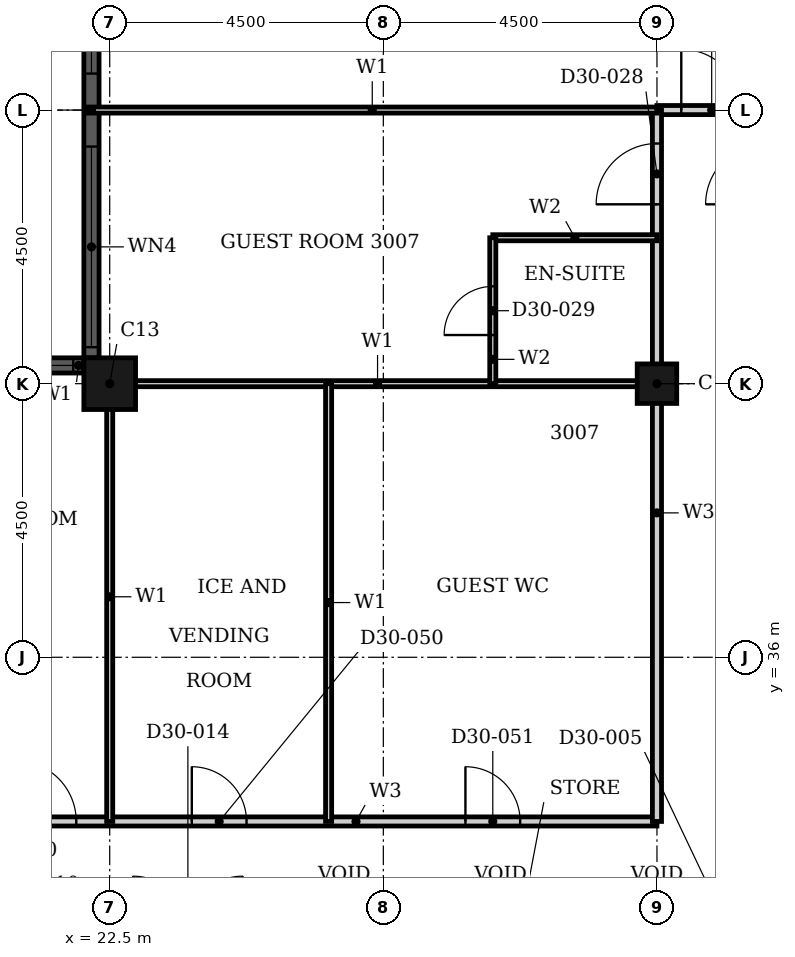
"""IFC4 building model, lengths in metres.
Left out: names, types, materials, properties, quantities, classifications, styles, units other than length and angle.
Written with IfcOpenShell. Run it as: python <this file> out.ifc"""

import sys

from ifc_helpers import new_model, si_unit, direction, frame, frame_2d, origin, origin_2d, place, context, subcontext, project, spatial, rectangle, hollow_rectangle, extrude, element, fill, save


model = new_model("IFC4")
c1 = context("Model", 3, precision=1e-05, world=origin(), true_north=direction((0.0, 1.0)))
c2 = subcontext(c1, "Body", "Model", "MODEL_VIEW")
j1 = project(units=[si_unit("LENGTHUNIT", "METRE"), si_unit("PLANEANGLEUNIT", "RADIAN")], contexts=[c1])
p1 = place(None, origin())
s1 = spatial("IfcSite", under=j1, at=p1, CompositionType="ELEMENT")
p2 = place(p1, origin())
s2 = spatial("IfcBuilding", under=s1, at=p2, CompositionType="ELEMENT")
p3 = place(p2, frame((0.0, 0.0, 122.4)))
s3 = spatial("IfcBuildingStorey", under=s2, at=p3, CompositionType="ELEMENT", Elevation=122.4)
p4 = place(p3, frame((22.5, 40.5, 0.0), z_axis=(0.0, 0.0, 1.0), x_axis=(1.0, 0.0, 0.0)))
e1 = element("IfcColumn", 1, at=p4, inside=s3, PredefinedType="COLUMN", context=c2, shape_type="SweptSolid", body=[
    extrude(hollow_rectangle(XDim=0.85, YDim=0.85, WallThickness=0.026, at=origin_2d()), origin(), (0.0, 0.0, 1.0), 3.6),
])
p5 = place(p3, frame((31.5, 40.5, 0.0), z_axis=(0.0, 0.0, 1.0), x_axis=(1.0, 0.0, 0.0)))
e2 = element("IfcColumn", 2, at=p5, inside=s3, PredefinedType="COLUMN", context=c2, shape_type="SweptSolid", body=[
    extrude(hollow_rectangle(XDim=0.65, YDim=0.65, WallThickness=0.021, at=origin_2d()), origin(), (0.0, 0.0, 1.0), 3.6),
])
p6 = place(p3, frame((22.2, 49.075, 0.0), z_axis=(0.0, 0.0, 1.0), x_axis=(0.0, -1.0, 0.0)))
e3 = element("IfcWall", 3, at=p6, inside=s3, PredefinedType="SOLIDWALL", context=c2, shape_type="SweptSolid", body=[
    extrude(rectangle(XDim=8.15, YDim=0.25, at=frame_2d((4.075, 0.0))), origin(), (0.0, 0.0, 1.0), 3.6),
])
p7 = place(p6, frame((0.175, 0.0, 0.9)))
e4 = element("IfcOpeningElement", 4, at=p7, cuts=e3, PredefinedType="OPENING", context=c2, shape_type="SweptSolid", body=[
    extrude(rectangle(XDim=3.3, YDim=2.08, at=frame_2d((1.65, 1.04))), frame((0.0, 0.135, 0.0), z_axis=(0.0, -1.0, 0.0), x_axis=(1.0, 0.0, 0.0)), (0.0, 0.0, 1.0), 0.27),
])
p8 = place(p6, frame((4.675, 0.0, 0.9)))
e5 = element("IfcOpeningElement", 5, at=p8, cuts=e3, PredefinedType="OPENING", context=c2, shape_type="SweptSolid", body=[
    extrude(rectangle(XDim=3.3, YDim=2.08, at=frame_2d((1.65, 1.04))), frame((0.0, 0.135, 0.0), z_axis=(0.0, -1.0, 0.0), x_axis=(1.0, 0.0, 0.0)), (0.0, 0.0, 1.0), 0.27),
])
p9 = place(p3, frame((22.075, 40.8, 0.0), z_axis=(0.0, 0.0, 1.0), x_axis=(-1.0, 0.0, 0.0)))
e6 = element("IfcWall", 6, at=p9, inside=s3, PredefinedType="SOLIDWALL", context=c2, shape_type="SweptSolid", body=[
    extrude(rectangle(XDim=3.65, YDim=0.25, at=frame_2d((1.825, 0.0))), origin(), (0.0, 0.0, 1.0), 3.6),
])
p10 = place(p9, frame((0.175, 0.0, 0.9)))
e7 = element("IfcOpeningElement", 7, at=p10, cuts=e6, PredefinedType="OPENING", context=c2, shape_type="SweptSolid", body=[
    extrude(rectangle(XDim=3.3, YDim=2.08, at=frame_2d((1.65, 1.04))), frame((0.0, 0.135, 0.0), z_axis=(0.0, -1.0, 0.0), x_axis=(1.0, 0.0, 0.0)), (0.0, 0.0, 1.0), 0.27),
])
p11 = place(p3, frame((18.0, 33.3, 0.0), z_axis=(0.0, 0.0, 1.0), x_axis=(1.0, 0.0, 0.0)))
e8 = element("IfcWall", 8, at=p11, inside=s3, PredefinedType="PARTITIONING", context=c2, shape_type="SweptSolid", body=[
    extrude(rectangle(XDim=13.5, YDim=0.15, at=frame_2d((6.75, 0.0))), origin(), (0.0, 0.0, 1.0), 3.3),
])
p12 = place(p11, frame((2.95, 0.0, 0.0)))
e9 = element("IfcOpeningElement", 9, at=p12, cuts=e8, PredefinedType="OPENING", context=c2, shape_type="SweptSolid", body=[
    extrude(rectangle(XDim=1.0, YDim=2.1, at=frame_2d((0.5, 1.05))), frame((0.0, 0.085, 0.0), z_axis=(0.0, -1.0, 0.0), x_axis=(1.0, 0.0, 0.0)), (0.0, 0.0, 1.0), 0.17),
])
p13 = place(p11, frame((5.85, 0.0, 0.0)))
e10 = element("IfcOpeningElement", 10, at=p13, cuts=e8, PredefinedType="OPENING", context=c2, shape_type="SweptSolid", body=[
    extrude(rectangle(XDim=0.9, YDim=2.1, at=frame_2d((0.45, 1.05))), frame((0.0, 0.085, 0.0), z_axis=(0.0, -1.0, 0.0), x_axis=(1.0, 0.0, 0.0)), (0.0, 0.0, 1.0), 0.17),
])
p14 = place(p11, frame((10.35, 0.0, 0.0)))
e11 = element("IfcOpeningElement", 11, at=p14, cuts=e8, PredefinedType="OPENING", context=c2, shape_type="SweptSolid", body=[
    extrude(rectangle(XDim=0.9, YDim=2.1, at=frame_2d((0.45, 1.05))), frame((0.0, 0.085, 0.0), z_axis=(0.0, -1.0, 0.0), x_axis=(1.0, 0.0, 0.0)), (0.0, 0.0, 1.0), 0.17),
])
p15 = place(p3, frame((31.5, 45.0, 0.0), z_axis=(0.0, 0.0, 1.0), x_axis=(1.0, 0.0, 0.0)))
e12 = element("IfcWall", 12, at=p15, inside=s3, PredefinedType="PARTITIONING", context=c2, shape_type="SweptSolid", body=[
    extrude(rectangle(XDim=1.8, YDim=0.15, at=frame_2d((0.9, 0.0))), origin(), (0.0, 0.0, 1.0), 3.3),
])
p16 = place(p15, frame((0.4, 0.0, 0.0)))
e13 = element("IfcOpeningElement", 13, at=p16, cuts=e12, PredefinedType="OPENING", context=c2, shape_type="SweptSolid", body=[
    extrude(rectangle(XDim=1.0, YDim=2.1, at=frame_2d((0.5, 1.05))), frame((0.0, 0.085, 0.0), z_axis=(0.0, -1.0, 0.0), x_axis=(1.0, 0.0, 0.0)), (0.0, 0.0, 1.0), 0.17),
])
p17 = place(p3, frame((31.5, 33.3, 0.0), z_axis=(0.0, 0.0, 1.0), x_axis=(0.0, 1.0, 0.0)))
e14 = element("IfcWall", 14, at=p17, inside=s3, PredefinedType="PARTITIONING", context=c2, shape_type="SweptSolid", body=[
    extrude(rectangle(XDim=11.7, YDim=0.15, at=frame_2d((5.85, 0.0))), origin(), (0.0, 0.0, 1.0), 2.58),
])
p18 = place(p17, frame((10.15, 0.0, 0.0)))
e15 = element("IfcOpeningElement", 15, at=p18, cuts=e14, PredefinedType="OPENING", context=c2, shape_type="SweptSolid", body=[
    extrude(rectangle(XDim=1.0, YDim=2.1, at=frame_2d((0.5, 1.05))), frame((0.0, 0.085, 0.0), z_axis=(0.0, -1.0, 0.0), x_axis=(1.0, 0.0, 0.0)), (0.0, 0.0, 1.0), 0.17),
])
p19 = place(p3, frame((22.31, 40.5, 0.0), z_axis=(0.0, 0.0, 1.0), x_axis=(1.0, 0.0, 0.0)))
e16 = element("IfcWall", 16, at=p19, inside=s3, PredefinedType="PARTITIONING", context=c2, shape_type="SweptSolid", body=[
    extrude(rectangle(XDim=9.19, YDim=0.1, at=frame_2d((4.595, 0.0))), origin(), (0.0, 0.0, 1.0), 2.38),
])
p20 = place(p3, frame((22.135, 45.0, 0.0), z_axis=(0.0, 0.0, 1.0), x_axis=(1.0, 0.0, 0.0)))
e17 = element("IfcWall", 17, at=p20, inside=s3, PredefinedType="PARTITIONING", context=c2, shape_type="SweptSolid", body=[
    extrude(rectangle(XDim=9.365, YDim=0.1, at=frame_2d((4.683, 0.0))), origin(), (0.0, 0.0, 1.0), 3.3),
])
p21 = place(p3, frame((22.5, 33.3, 0.0), z_axis=(0.0, 0.0, 1.0), x_axis=(0.0, 1.0, 0.0)))
e18 = element("IfcWall", 18, at=p21, inside=s3, PredefinedType="PARTITIONING", context=c2, shape_type="SweptSolid", body=[
    extrude(rectangle(XDim=7.39, YDim=0.1, at=frame_2d((3.695, 0.0))), origin(), (0.0, 0.0, 1.0), 3.3),
])
p22 = place(p3, frame((26.1, 33.3, 0.0), z_axis=(0.0, 0.0, 1.0), x_axis=(0.0, 1.0, 0.0)))
e19 = element("IfcWall", 19, at=p22, inside=s3, PredefinedType="PARTITIONING", context=c2, shape_type="SweptSolid", body=[
    extrude(rectangle(XDim=7.2, YDim=0.1, at=frame_2d((3.6, 0.0))), origin(), (0.0, 0.0, 1.0), 3.3),
])
p23 = place(p3, frame((28.8, 42.9, 0.0), z_axis=(0.0, 0.0, 1.0), x_axis=(1.0, 0.0, 0.0)))
e20 = element("IfcWall", 20, at=p23, inside=s3, PredefinedType="PARTITIONING", context=c2, shape_type="SweptSolid", body=[
    extrude(rectangle(XDim=2.7, YDim=0.1, at=frame_2d((1.35, 0.0))), origin(), (0.0, 0.0, 1.0), 3.3),
])
p24 = place(p3, frame((28.8, 40.5, 0.0), z_axis=(0.0, 0.0, 1.0), x_axis=(0.0, 1.0, 0.0)))
e21 = element("IfcWall", 21, at=p24, inside=s3, PredefinedType="PARTITIONING", context=c2, shape_type="SweptSolid", body=[
    extrude(rectangle(XDim=2.4, YDim=0.1, at=frame_2d((1.2, 0.0))), origin(), (0.0, 0.0, 1.0), 3.3),
])
p25 = place(p24, frame((0.8, 0.0, 0.0)))
e22 = element("IfcOpeningElement", 22, at=p25, cuts=e21, PredefinedType="OPENING", context=c2, shape_type="SweptSolid", body=[
    extrude(rectangle(XDim=0.8, YDim=2.1, at=frame_2d((0.4, 1.05))), frame((0.0, 0.06, 0.0), z_axis=(0.0, -1.0, 0.0), x_axis=(1.0, 0.0, 0.0)), (0.0, 0.0, 1.0), 0.12),
])
p26 = place(p7, origin())
e23 = element("IfcWindow", 23, at=p26, inside=s3, PartitioningType="SINGLE_PANEL", PredefinedType="WINDOW", context=c2, shape_type="SweptSolid", body=[
    extrude(rectangle(XDim=3.3, YDim=2.08, at=frame_2d((1.65, 1.04))), frame((0.0, 0.03, 0.0), z_axis=(0.0, -1.0, 0.0), x_axis=(1.0, 0.0, 0.0)), (0.0, 0.0, 1.0), 0.06),
])
fill(e4, e23)
p27 = place(p8, origin())
e24 = element("IfcWindow", 24, at=p27, inside=s3, PartitioningType="SINGLE_PANEL", PredefinedType="WINDOW", context=c2, shape_type="SweptSolid", body=[
    extrude(rectangle(XDim=3.3, YDim=2.08, at=frame_2d((1.65, 1.04))), frame((0.0, 0.03, 0.0), z_axis=(0.0, -1.0, 0.0), x_axis=(1.0, 0.0, 0.0)), (0.0, 0.0, 1.0), 0.06),
])
fill(e5, e24)
p28 = place(p10, origin())
e25 = element("IfcWindow", 25, at=p28, inside=s3, PartitioningType="SINGLE_PANEL", PredefinedType="WINDOW", context=c2, shape_type="SweptSolid", body=[
    extrude(rectangle(XDim=3.3, YDim=2.08, at=frame_2d((1.65, 1.04))), frame((0.0, 0.03, 0.0), z_axis=(0.0, -1.0, 0.0), x_axis=(1.0, 0.0, 0.0)), (0.0, 0.0, 1.0), 0.06),
])
fill(e7, e25)
p29 = place(p18, origin())
e26 = element("IfcDoor", 26, at=p29, inside=s3, OperationType="SINGLE_SWING_RIGHT", PredefinedType="DOOR", context=c2, shape_type="SweptSolid", body=[
    extrude(rectangle(XDim=1.0, YDim=2.1, at=frame_2d((0.5, 1.05))), frame((0.0, 0.025, 0.0), z_axis=(0.0, -1.0, 0.0), x_axis=(1.0, 0.0, 0.0)), (0.0, 0.0, 1.0), 0.05),
])
fill(e15, e26)
p30 = place(p25, origin())
e27 = element("IfcDoor", 27, at=p30, inside=s3, OperationType="SINGLE_SWING_RIGHT", PredefinedType="DOOR", context=c2, shape_type="SweptSolid", body=[
    extrude(rectangle(XDim=0.8, YDim=2.1, at=frame_2d((0.4, 1.05))), frame((0.0, 0.025, 0.0), z_axis=(0.0, -1.0, 0.0), x_axis=(1.0, 0.0, 0.0)), (0.0, 0.0, 1.0), 0.05),
])
fill(e22, e27)
p31 = place(p16, origin())
e28 = element("IfcDoor", 28, at=p31, inside=s3, OperationType="SINGLE_SWING_LEFT", PredefinedType="DOOR", context=c2, shape_type="SweptSolid", body=[
    extrude(rectangle(XDim=1.0, YDim=2.1, at=frame_2d((0.5, 1.05))), frame((0.0, 0.025, 0.0), z_axis=(0.0, -1.0, 0.0), x_axis=(1.0, 0.0, 0.0)), (0.0, 0.0, 1.0), 0.05),
])
fill(e13, e28)
p32 = place(p12, origin())
e29 = element("IfcDoor", 29, at=p32, inside=s3, OperationType="SINGLE_SWING_RIGHT", PredefinedType="DOOR", context=c2, shape_type="SweptSolid", body=[
    extrude(rectangle(XDim=1.0, YDim=2.1, at=frame_2d((0.5, 1.05))), frame((0.0, 0.025, 0.0), z_axis=(0.0, -1.0, 0.0), x_axis=(1.0, 0.0, 0.0)), (0.0, 0.0, 1.0), 0.05),
])
fill(e9, e29)
p33 = place(p13, origin())
e30 = element("IfcDoor", 30, at=p33, inside=s3, OperationType="SINGLE_SWING_RIGHT", PredefinedType="DOOR", context=c2, shape_type="SweptSolid", body=[
    extrude(rectangle(XDim=0.9, YDim=2.1, at=frame_2d((0.45, 1.05))), frame((0.0, 0.025, 0.0), z_axis=(0.0, -1.0, 0.0), x_axis=(1.0, 0.0, 0.0)), (0.0, 0.0, 1.0), 0.05),
])
fill(e10, e30)
p34 = place(p14, origin())
e31 = element("IfcDoor", 31, at=p34, inside=s3, OperationType="SINGLE_SWING_RIGHT", PredefinedType="DOOR", context=c2, shape_type="SweptSolid", body=[
    extrude(rectangle(XDim=0.9, YDim=2.1, at=frame_2d((0.45, 1.05))), frame((0.0, 0.025, 0.0), z_axis=(0.0, -1.0, 0.0), x_axis=(1.0, 0.0, 0.0)), (0.0, 0.0, 1.0), 0.05),
])
fill(e11, e31)
save(model, sys.argv[1])
